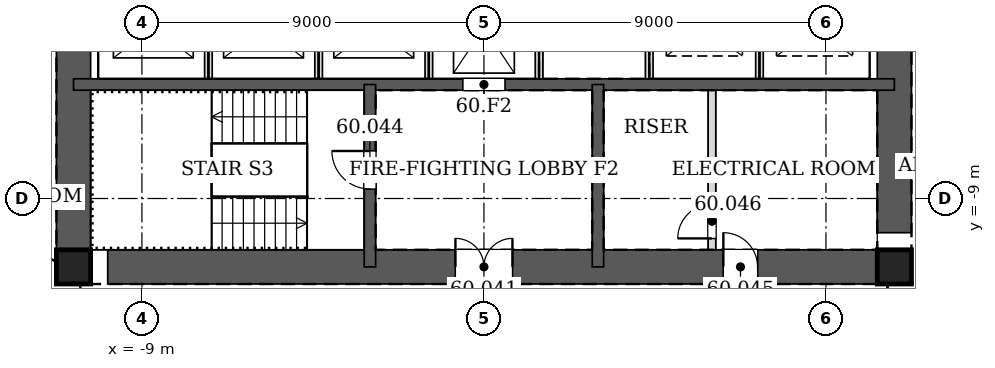
"""IFC4 building model, lengths in metres.
Left out: names, types, materials, properties, quantities, classifications, styles, units other than length and angle.
Written with IfcOpenShell. Run it as: python <this file> out.ifc"""

import sys

from ifc_helpers import new_model, si_unit, direction, frame, frame_2d, origin, origin_2d, place, context, subcontext, project, spatial, rectangle, hollow_rectangle, extrude, element, fill, save


model = new_model("IFC4")
c1 = context("Model", 3, precision=1e-05, world=origin(), true_north=direction((0.0, 1.0)))
c2 = subcontext(c1, "Body", "Model", "MODEL_VIEW")
j1 = project(units=[si_unit("LENGTHUNIT", "METRE"), si_unit("PLANEANGLEUNIT", "RADIAN")], contexts=[c1])
p1 = place(None, origin())
s1 = spatial("IfcSite", under=j1, at=p1, CompositionType="ELEMENT")
p2 = place(p1, origin())
s2 = spatial("IfcBuilding", under=s1, at=p2, CompositionType="ELEMENT")
p3 = place(p2, frame((0.0, 0.0, 251.6)))
s3 = spatial("IfcBuildingStorey", under=s2, at=p3, CompositionType="ELEMENT", Elevation=251.6)
for number, where, z_axis, x_axis in (
    (1, (-10.8, -10.8, 0.0), (0.0, 0.0, 1.0), (1.0, 0.0, 0.0)),
    (2, (10.8, -10.8, 0.0), (0.0, 0.0, 1.0), (1.0, 0.0, 0.0)),
):
    element("IfcColumn", number, at=place(p3, frame(where, z_axis=z_axis, x_axis=x_axis)), inside=s3, PredefinedType="COLUMN", context=c2, shape_type="SweptSolid", body=[
        extrude(hollow_rectangle(XDim=0.9, YDim=0.9, WallThickness=0.04, at=origin_2d()), origin(), (0.0, 0.0, 1.0), 3.4),
    ])
p4 = place(p3, frame((-10.8, -10.8, 0.0), z_axis=(0.0, 0.0, 1.0), x_axis=(1.0, 0.0, 0.0)))
e3 = element("IfcWall", 3, at=p4, inside=s3, PredefinedType="SOLIDWALL", context=c2, shape_type="SweptSolid", body=[
    extrude(rectangle(XDim=21.6, YDim=0.9, at=frame_2d((10.8, 0.0))), origin(), (0.0, 0.0, 1.0), 3.4),
])
p5 = place(p4, frame((10.05, 0.0, 0.0)))
e4 = element("IfcOpeningElement", 4, at=p5, cuts=e3, PredefinedType="OPENING", context=c2, shape_type="SweptSolid", body=[
    extrude(rectangle(XDim=1.5, YDim=2.1, at=frame_2d((0.75, 1.05))), frame((0.0, 0.46, 0.0), z_axis=(0.0, -1.0, 0.0), x_axis=(1.0, 0.0, 0.0)), (0.0, 0.0, 1.0), 0.92),
])
p6 = place(p4, frame((17.1, 0.0, 0.0)))
e5 = element("IfcOpeningElement", 5, at=p6, cuts=e3, PredefinedType="OPENING", context=c2, shape_type="SweptSolid", body=[
    extrude(rectangle(XDim=0.9, YDim=2.1, at=frame_2d((0.45, 1.05))), frame((0.0, 0.46, 0.0), z_axis=(0.0, -1.0, 0.0), x_axis=(1.0, 0.0, 0.0)), (0.0, 0.0, 1.0), 0.92),
])
p7 = place(p3, frame((10.8, -10.8, 0.0), z_axis=(0.0, 0.0, 1.0), x_axis=(0.0, 1.0, 0.0)))
e6 = element("IfcWall", 6, at=p7, inside=s3, PredefinedType="SOLIDWALL", context=c2, shape_type="SweptSolid", body=[
    extrude(rectangle(XDim=21.6, YDim=0.9, at=frame_2d((10.8, 0.0))), origin(), (0.0, 0.0, 1.0), 3.4),
])
p8 = place(p7, frame((11.7, 0.0, 0.0)))
e7 = element("IfcOpeningElement", 7, at=p8, cuts=e6, PredefinedType="OPENING", context=c2, shape_type="SweptSolid", body=[
    extrude(rectangle(XDim=1.2, YDim=2.1, at=frame_2d((0.6, 1.05))), frame((0.0, 0.46, 0.0), z_axis=(0.0, -1.0, 0.0), x_axis=(1.0, 0.0, 0.0)), (0.0, 0.0, 1.0), 0.92),
])
p9 = place(p7, frame((8.7, 0.0, 0.0)))
e8 = element("IfcOpeningElement", 8, at=p9, cuts=e6, PredefinedType="OPENING", context=c2, shape_type="SweptSolid", body=[
    extrude(rectangle(XDim=1.2, YDim=2.1, at=frame_2d((0.6, 1.05))), frame((0.0, 0.46, 0.0), z_axis=(0.0, -1.0, 0.0), x_axis=(1.0, 0.0, 0.0)), (0.0, 0.0, 1.0), 0.92),
])
p10 = place(p3, frame((-10.8, 10.8, 0.0), z_axis=(0.0, 0.0, 1.0), x_axis=(0.0, -1.0, 0.0)))
e9 = element("IfcWall", 9, at=p10, inside=s3, PredefinedType="SOLIDWALL", context=c2, shape_type="SweptSolid", body=[
    extrude(rectangle(XDim=21.6, YDim=0.9, at=frame_2d((10.8, 0.0))), origin(), (0.0, 0.0, 1.0), 3.4),
])
p11 = place(p10, frame((8.7, 0.0, 0.0)))
e10 = element("IfcOpeningElement", 10, at=p11, cuts=e9, PredefinedType="OPENING", context=c2, shape_type="SweptSolid", body=[
    extrude(rectangle(XDim=1.2, YDim=2.1, at=frame_2d((0.6, 1.05))), frame((0.0, 0.46, 0.0), z_axis=(0.0, -1.0, 0.0), x_axis=(1.0, 0.0, 0.0)), (0.0, 0.0, 1.0), 0.92),
])
p12 = place(p10, frame((11.7, 0.0, 0.0)))
e11 = element("IfcOpeningElement", 11, at=p12, cuts=e9, PredefinedType="OPENING", context=c2, shape_type="SweptSolid", body=[
    extrude(rectangle(XDim=1.2, YDim=2.1, at=frame_2d((0.6, 1.05))), frame((0.0, 0.46, 0.0), z_axis=(0.0, -1.0, 0.0), x_axis=(1.0, 0.0, 0.0)), (0.0, 0.0, 1.0), 0.92),
])
p13 = place(p3, frame((-10.8, -6.0, 0.0), z_axis=(0.0, 0.0, 1.0), x_axis=(1.0, 0.0, 0.0)))
e12 = element("IfcWall", 12, at=p13, inside=s3, PredefinedType="SOLIDWALL", context=c2, shape_type="SweptSolid", body=[
    extrude(rectangle(XDim=21.6, YDim=0.3, at=frame_2d((10.8, 0.0))), origin(), (0.0, 0.0, 1.0), 3.4),
])
p14 = place(p13, frame((10.25, 0.0, 0.0)))
e13 = element("IfcOpeningElement", 13, at=p14, cuts=e12, PredefinedType="OPENING", context=c2, shape_type="SweptSolid", body=[
    extrude(rectangle(XDim=1.1, YDim=2.1, at=frame_2d((0.55, 1.05))), frame((0.0, 0.16, 0.0), z_axis=(0.0, -1.0, 0.0), x_axis=(1.0, 0.0, 0.0)), (0.0, 0.0, 1.0), 0.32),
])
p15 = place(p3, frame((-3.0, -6.0, 0.0), z_axis=(0.0, 0.0, 1.0), x_axis=(0.0, -1.0, 0.0)))
e14 = element("IfcWall", 14, at=p15, inside=s3, PredefinedType="SOLIDWALL", context=c2, shape_type="SweptSolid", body=[
    extrude(rectangle(XDim=4.8, YDim=0.3, at=frame_2d((2.4, 0.0))), origin(), (0.0, 0.0, 1.0), 3.4),
])
p16 = place(p15, frame((1.75, 0.0, 0.0)))
e15 = element("IfcOpeningElement", 15, at=p16, cuts=e14, PredefinedType="OPENING", context=c2, shape_type="SweptSolid", body=[
    extrude(rectangle(XDim=1.0, YDim=2.1, at=frame_2d((0.5, 1.05))), frame((0.0, 0.16, 0.0), z_axis=(0.0, -1.0, 0.0), x_axis=(1.0, 0.0, 0.0)), (0.0, 0.0, 1.0), 0.32),
])
p17 = place(p3, frame((3.0, -6.0, 0.0), z_axis=(0.0, 0.0, 1.0), x_axis=(0.0, -1.0, 0.0)))
e16 = element("IfcWall", 16, at=p17, inside=s3, PredefinedType="SOLIDWALL", context=c2, shape_type="SweptSolid", body=[
    extrude(rectangle(XDim=4.8, YDim=0.3, at=frame_2d((2.4, 0.0))), origin(), (0.0, 0.0, 1.0), 3.4),
])
for number, where, z_axis, x_axis in (
    (17, (-7.25, -5.85, 0.0), (0.0, 0.0, 1.0), (0.0, 1.0, 0.0)),
    (18, (-4.35, -5.85, 0.0), (0.0, 0.0, 1.0), (0.0, 1.0, 0.0)),
    (19, (-1.45, -5.85, 0.0), (0.0, 0.0, 1.0), (0.0, 1.0, 0.0)),
):
    element("IfcWall", number, at=place(p3, frame(where, z_axis=z_axis, x_axis=x_axis)), inside=s3, PredefinedType="PARTITIONING", context=c2, shape_type="SweptSolid", body=[
        extrude(rectangle(XDim=2.7, YDim=0.2, at=frame_2d((1.35, 0.0))), origin(), (0.0, 0.0, 1.0), 3.4),
    ])
for number, where, z_axis, x_axis in (
    (20, (1.45, -5.85, 0.0), (0.0, 0.0, 1.0), (0.0, 1.0, 0.0)),
    (21, (4.35, -5.85, 0.0), (0.0, 0.0, 1.0), (0.0, 1.0, 0.0)),
):
    element("IfcWall", number, at=place(p3, frame(where, z_axis=z_axis, x_axis=x_axis)), inside=s3, PredefinedType="PARTITIONING", context=c2, shape_type="SweptSolid", body=[
        extrude(rectangle(XDim=2.7, YDim=0.2, at=frame_2d((1.35, 0.0))), origin(), (0.0, 0.0, 1.0), 3.2),
    ])
p18 = place(p3, frame((7.25, -5.85, 0.0), z_axis=(0.0, 0.0, 1.0), x_axis=(0.0, 1.0, 0.0)))
e22 = element("IfcWall", 22, at=p18, inside=s3, PredefinedType="PARTITIONING", context=c2, shape_type="SweptSolid", body=[
    extrude(rectangle(XDim=2.7, YDim=0.2, at=frame_2d((1.35, 0.0))), origin(), (0.0, 0.0, 1.0), 3.4),
])
p19 = place(p3, frame((6.0, -10.35, 0.0), z_axis=(0.0, 0.0, 1.0), x_axis=(0.0, 1.0, 0.0)))
e23 = element("IfcWall", 23, at=p19, inside=s3, PredefinedType="PARTITIONING", context=c2, shape_type="SweptSolid", body=[
    extrude(rectangle(XDim=4.2, YDim=0.2, at=frame_2d((2.1, 0.0))), origin(), (0.0, 0.0, 1.0), 3.2),
])
p20 = place(p19, frame((0.3, 0.0, 0.0)))
e24 = element("IfcOpeningElement", 24, at=p20, cuts=e23, PredefinedType="OPENING", context=c2, shape_type="SweptSolid", body=[
    extrude(rectangle(XDim=0.9, YDim=2.1, at=frame_2d((0.45, 1.05))), frame((0.0, 0.11, 0.0), z_axis=(0.0, -1.0, 0.0), x_axis=(1.0, 0.0, 0.0)), (0.0, 0.0, 1.0), 0.22),
])
p21 = place(p5, origin())
e25 = element("IfcDoor", 25, at=p21, inside=s3, OperationType="DOUBLE_DOOR_SINGLE_SWING", PredefinedType="DOOR", context=c2, shape_type="SweptSolid", body=[
    extrude(rectangle(XDim=1.5, YDim=2.1, at=frame_2d((0.75, 1.05))), frame((0.0, 0.025, 0.0), z_axis=(0.0, -1.0, 0.0), x_axis=(1.0, 0.0, 0.0)), (0.0, 0.0, 1.0), 0.05),
])
fill(e4, e25)
p22 = place(p16, frame((1.0, 0.0, 0.0), z_axis=(0.0, 0.0, 1.0), x_axis=(-1.0, 0.0, 0.0)))
e26 = element("IfcDoor", 26, at=p22, inside=s3, OperationType="SINGLE_SWING_RIGHT", PredefinedType="DOOR", context=c2, shape_type="SweptSolid", body=[
    extrude(rectangle(XDim=1.0, YDim=2.1, at=frame_2d((0.5, 1.05))), frame((0.0, 0.025, 0.0), z_axis=(0.0, -1.0, 0.0), x_axis=(1.0, 0.0, 0.0)), (0.0, 0.0, 1.0), 0.05),
])
fill(e15, e26)
p23 = place(p6, origin())
e27 = element("IfcDoor", 27, at=p23, inside=s3, OperationType="SINGLE_SWING_LEFT", PredefinedType="DOOR", context=c2, shape_type="SweptSolid", body=[
    extrude(rectangle(XDim=0.9, YDim=2.1, at=frame_2d((0.45, 1.05))), frame((0.0, 0.025, 0.0), z_axis=(0.0, -1.0, 0.0), x_axis=(1.0, 0.0, 0.0)), (0.0, 0.0, 1.0), 0.05),
])
fill(e5, e27)
p24 = place(p20, origin())
e28 = element("IfcDoor", 28, at=p24, inside=s3, OperationType="SINGLE_SWING_LEFT", PredefinedType="DOOR", context=c2, shape_type="SweptSolid", body=[
    extrude(rectangle(XDim=0.9, YDim=2.1, at=frame_2d((0.45, 1.05))), frame((0.0, 0.025, 0.0), z_axis=(0.0, -1.0, 0.0), x_axis=(1.0, 0.0, 0.0)), (0.0, 0.0, 1.0), 0.05),
])
fill(e24, e28)
p25 = place(p14, origin())
e29 = element("IfcDoor", 29, at=p25, inside=s3, OperationType="DOUBLE_DOOR_SLIDING", PredefinedType="DOOR", context=c2, shape_type="SweptSolid", body=[
    extrude(rectangle(XDim=1.1, YDim=2.1, at=frame_2d((0.55, 1.05))), frame((0.0, 0.025, 0.0), z_axis=(0.0, -1.0, 0.0), x_axis=(1.0, 0.0, 0.0)), (0.0, 0.0, 1.0), 0.05),
])
fill(e13, e29)
save(model, sys.argv[1])
